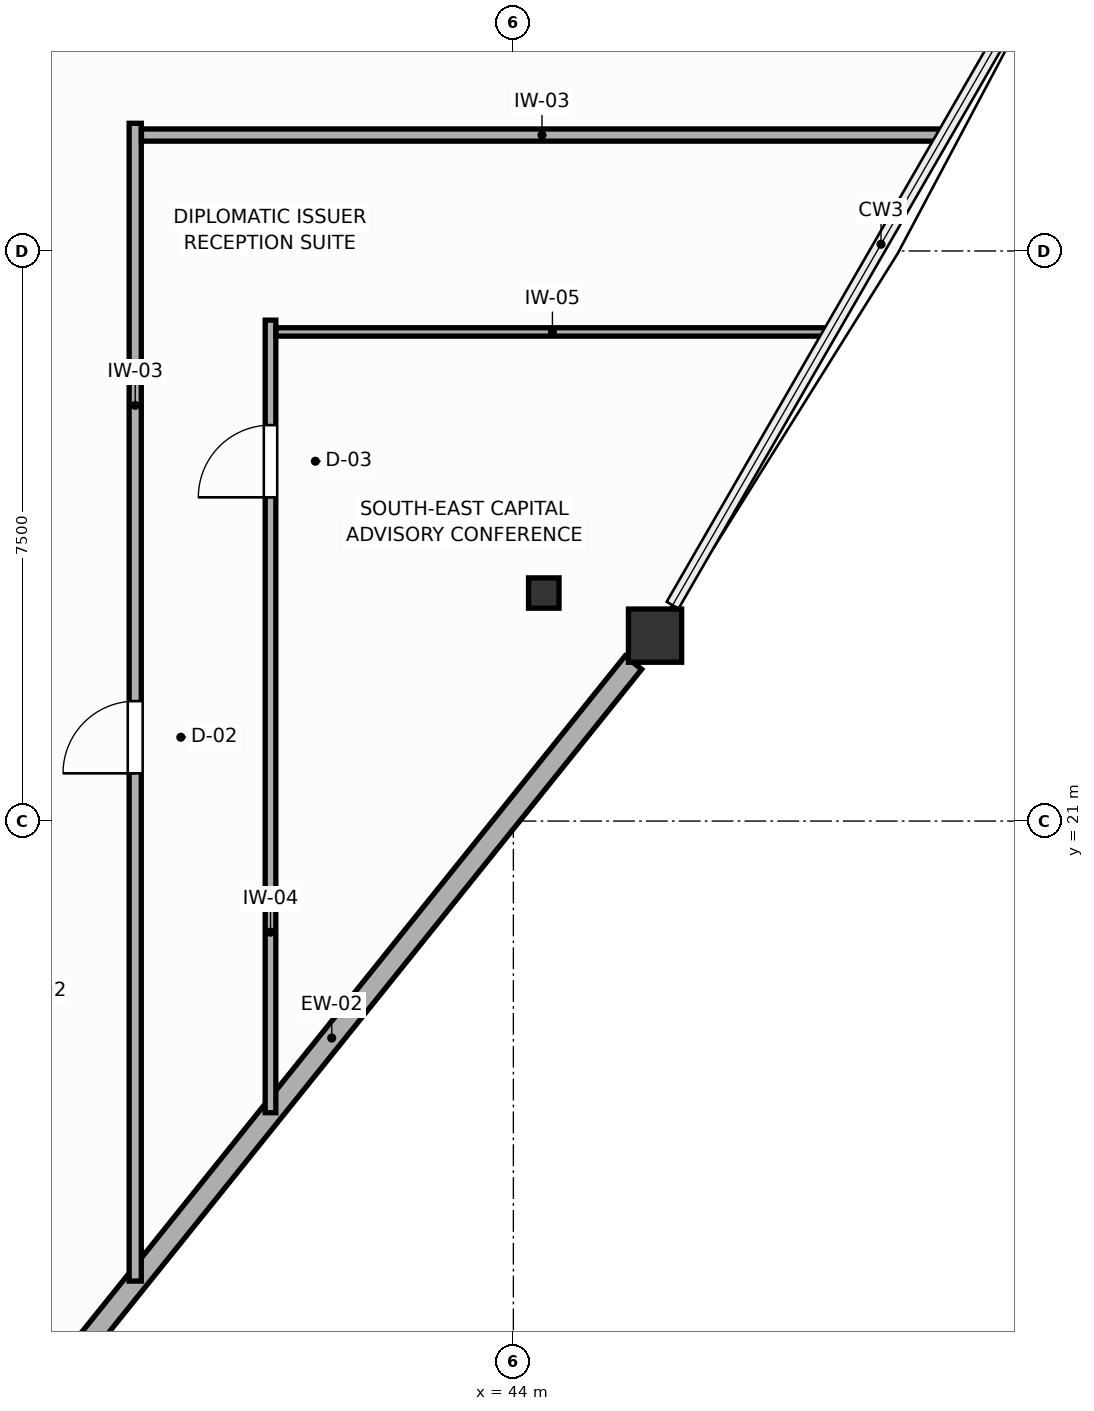
"""IFC4 building model, lengths in metres.
Left out: names, types, materials, properties, quantities, classifications, styles, units other than length and angle.
Written with IfcOpenShell. Run it as: python <this file> out.ifc"""

import sys

from ifc_helpers import new_model, si_unit, direction, frame, frame_2d, origin, origin_2d, place, context, subcontext, project, spatial, rectangle, i_section, extrude, source, transform, mapped, element, fill, save


model = new_model("IFC4")
c1 = context("Model", 3, precision=1e-05, world=origin(), true_north=direction((0.0, 1.0)))
c2 = subcontext(c1, "Body", "Model", "MODEL_VIEW")
j1 = project(units=[si_unit("LENGTHUNIT", "METRE"), si_unit("PLANEANGLEUNIT", "RADIAN")], contexts=[c1])
p1 = place(None, origin())
s1 = spatial("IfcSite", under=j1, at=p1, CompositionType="ELEMENT")
p2 = place(p1, origin())
s2 = spatial("IfcBuilding", under=s1, at=p2, CompositionType="ELEMENT")
p3 = place(p2, frame((0.0, 0.0, 253.8)))
s3 = spatial("IfcBuildingStorey", under=s2, at=p3, CompositionType="ELEMENT", Elevation=253.8)
m1 = source(origin(), c2, "Body", "SweptSolid", [
    extrude(i_section(OverallWidth=0.401, OverallDepth=0.399, WebThickness=0.022, FlangeThickness=0.036, FilletRadius=0.015, at=origin_2d()), origin(), (0.0, 0.0, 1.0), 3.6),
])
p4 = place(p3, frame((44.4, 24.0, 0.0), z_axis=(0.0, 0.0, 1.0), x_axis=(1.0, 0.0, 0.0)))
e1 = element("IfcColumn", 1, at=p4, inside=s3, PredefinedType="COLUMN", context=c2, shape_type="MappedRepresentation", body=[
    mapped(m1, transform((0.0, 0.0, 0.0), scale=1.0)),
])
m2 = source(origin(), c2, "Body", "SweptSolid", [
    extrude(rectangle(XDim=0.7, YDim=0.7, at=origin_2d()), origin(), (0.0, 0.0, 1.0), 3.6),
])
p5 = place(p3, frame((45.864, 23.439, 0.0), z_axis=(0.0, 0.0, 1.0), x_axis=(1.0, 0.0, 0.0)))
e2 = element("IfcColumn", 2, at=p5, inside=s3, PredefinedType="COLUMN", context=c2, shape_type="MappedRepresentation", body=[
    mapped(m2, transform((0.0, 0.0, 0.0), scale=1.0)),
])
p6 = place(p3, frame((37.642, 13.207, 0.0), z_axis=(0.0, 0.0, 1.0), x_axis=(0.626371247501, 0.77952489396, 0.0)))
e3 = element("IfcWall", 3, at=p6, inside=s3, PredefinedType="SOLIDWALL", context=c2, shape_type="SweptSolid", body=[
    extrude(rectangle(XDim=12.671, YDim=0.28, at=frame_2d((6.336, 0.0))), origin(), (0.0, 0.0, 1.0), 1.88),
])
p7 = place(p3, frame((39.025, 14.948, 0.0), z_axis=(0.0, 0.0, 1.0), x_axis=(0.0, 1.0, 0.0)))
e4 = element("IfcWall", 4, at=p7, inside=s3, PredefinedType="PARTITIONING", context=c2, shape_type="SweptSolid", body=[
    extrude(rectangle(XDim=15.232, YDim=0.16, at=frame_2d((7.616, 0.0))), origin(), (0.0, 0.0, 1.0), 3.41),
])
p8 = place(p7, frame((6.68, 0.0, 0.0)))
e5 = element("IfcOpeningElement", 5, at=p8, cuts=e4, PredefinedType="OPENING", context=c2, shape_type="SweptSolid", body=[
    extrude(rectangle(XDim=0.95, YDim=2.05, at=frame_2d((0.475, 1.025))), frame((0.0, 0.09, 0.0), z_axis=(0.0, -1.0, 0.0), x_axis=(1.0, 0.0, 0.0)), (0.0, 0.0, 1.0), 0.18),
])
p9 = place(p3, frame((39.107, 30.025, 0.0), z_axis=(0.0, 0.0, 1.0), x_axis=(1.0, 0.0, 0.0)))
e6 = element("IfcWall", 6, at=p9, inside=s3, PredefinedType="PARTITIONING", context=c2, shape_type="SweptSolid", body=[
    extrude(rectangle(XDim=10.539, YDim=0.16, at=frame_2d((5.27, 0.0))), origin(), (0.0, 0.0, 1.0), 3.41),
])
p10 = place(p3, frame((40.805, 17.163, 0.0), z_axis=(0.0, 0.0, 1.0), x_axis=(0.0, 1.0, 0.0)))
e7 = element("IfcWall", 7, at=p10, inside=s3, PredefinedType="PARTITIONING", context=c2, shape_type="SweptSolid", body=[
    extrude(rectangle(XDim=10.427, YDim=0.14, at=frame_2d((5.213, 0.0))), origin(), (0.0, 0.0, 1.0), 3.41),
])
p11 = place(p10, frame((8.096, 0.0, 0.0)))
e8 = element("IfcOpeningElement", 8, at=p11, cuts=e7, PredefinedType="OPENING", context=c2, shape_type="SweptSolid", body=[
    extrude(rectangle(XDim=0.95, YDim=2.05, at=frame_2d((0.475, 1.025))), frame((0.0, 0.08, 0.0), z_axis=(0.0, -1.0, 0.0), x_axis=(1.0, 0.0, 0.0)), (0.0, 0.0, 1.0), 0.16),
])
p12 = place(p3, frame((40.877, 27.435, 0.0), z_axis=(0.0, 0.0, 1.0), x_axis=(1.0, 0.0, 0.0)))
e9 = element("IfcWall", 9, at=p12, inside=s3, PredefinedType="MOVABLE", context=c2, shape_type="SweptSolid", body=[
    extrude(rectangle(XDim=7.274, YDim=0.11, at=frame_2d((3.637, 0.0))), origin(), (0.0, 0.0, 1.0), 3.41),
])
p13 = place(p8, origin())
e10 = element("IfcDoor", 10, at=p13, inside=s3, OperationType="SINGLE_SWING_LEFT", PredefinedType="DOOR", context=c2, shape_type="SweptSolid", body=[
    extrude(rectangle(XDim=0.95, YDim=2.05, at=frame_2d((0.475, 1.025))), frame((0.0, 0.025, 0.0), z_axis=(0.0, -1.0, 0.0), x_axis=(1.0, 0.0, 0.0)), (0.0, 0.0, 1.0), 0.05),
])
fill(e5, e10)
p14 = place(p11, origin())
e11 = element("IfcDoor", 11, at=p14, inside=s3, OperationType="SINGLE_SWING_LEFT", PredefinedType="DOOR", context=c2, shape_type="SweptSolid", body=[
    extrude(rectangle(XDim=0.95, YDim=2.05, at=frame_2d((0.475, 1.025))), frame((0.0, 0.025, 0.0), z_axis=(0.0, -1.0, 0.0), x_axis=(1.0, 0.0, 0.0)), (0.0, 0.0, 1.0), 0.05),
])
fill(e8, e11)
save(model, sys.argv[1])
